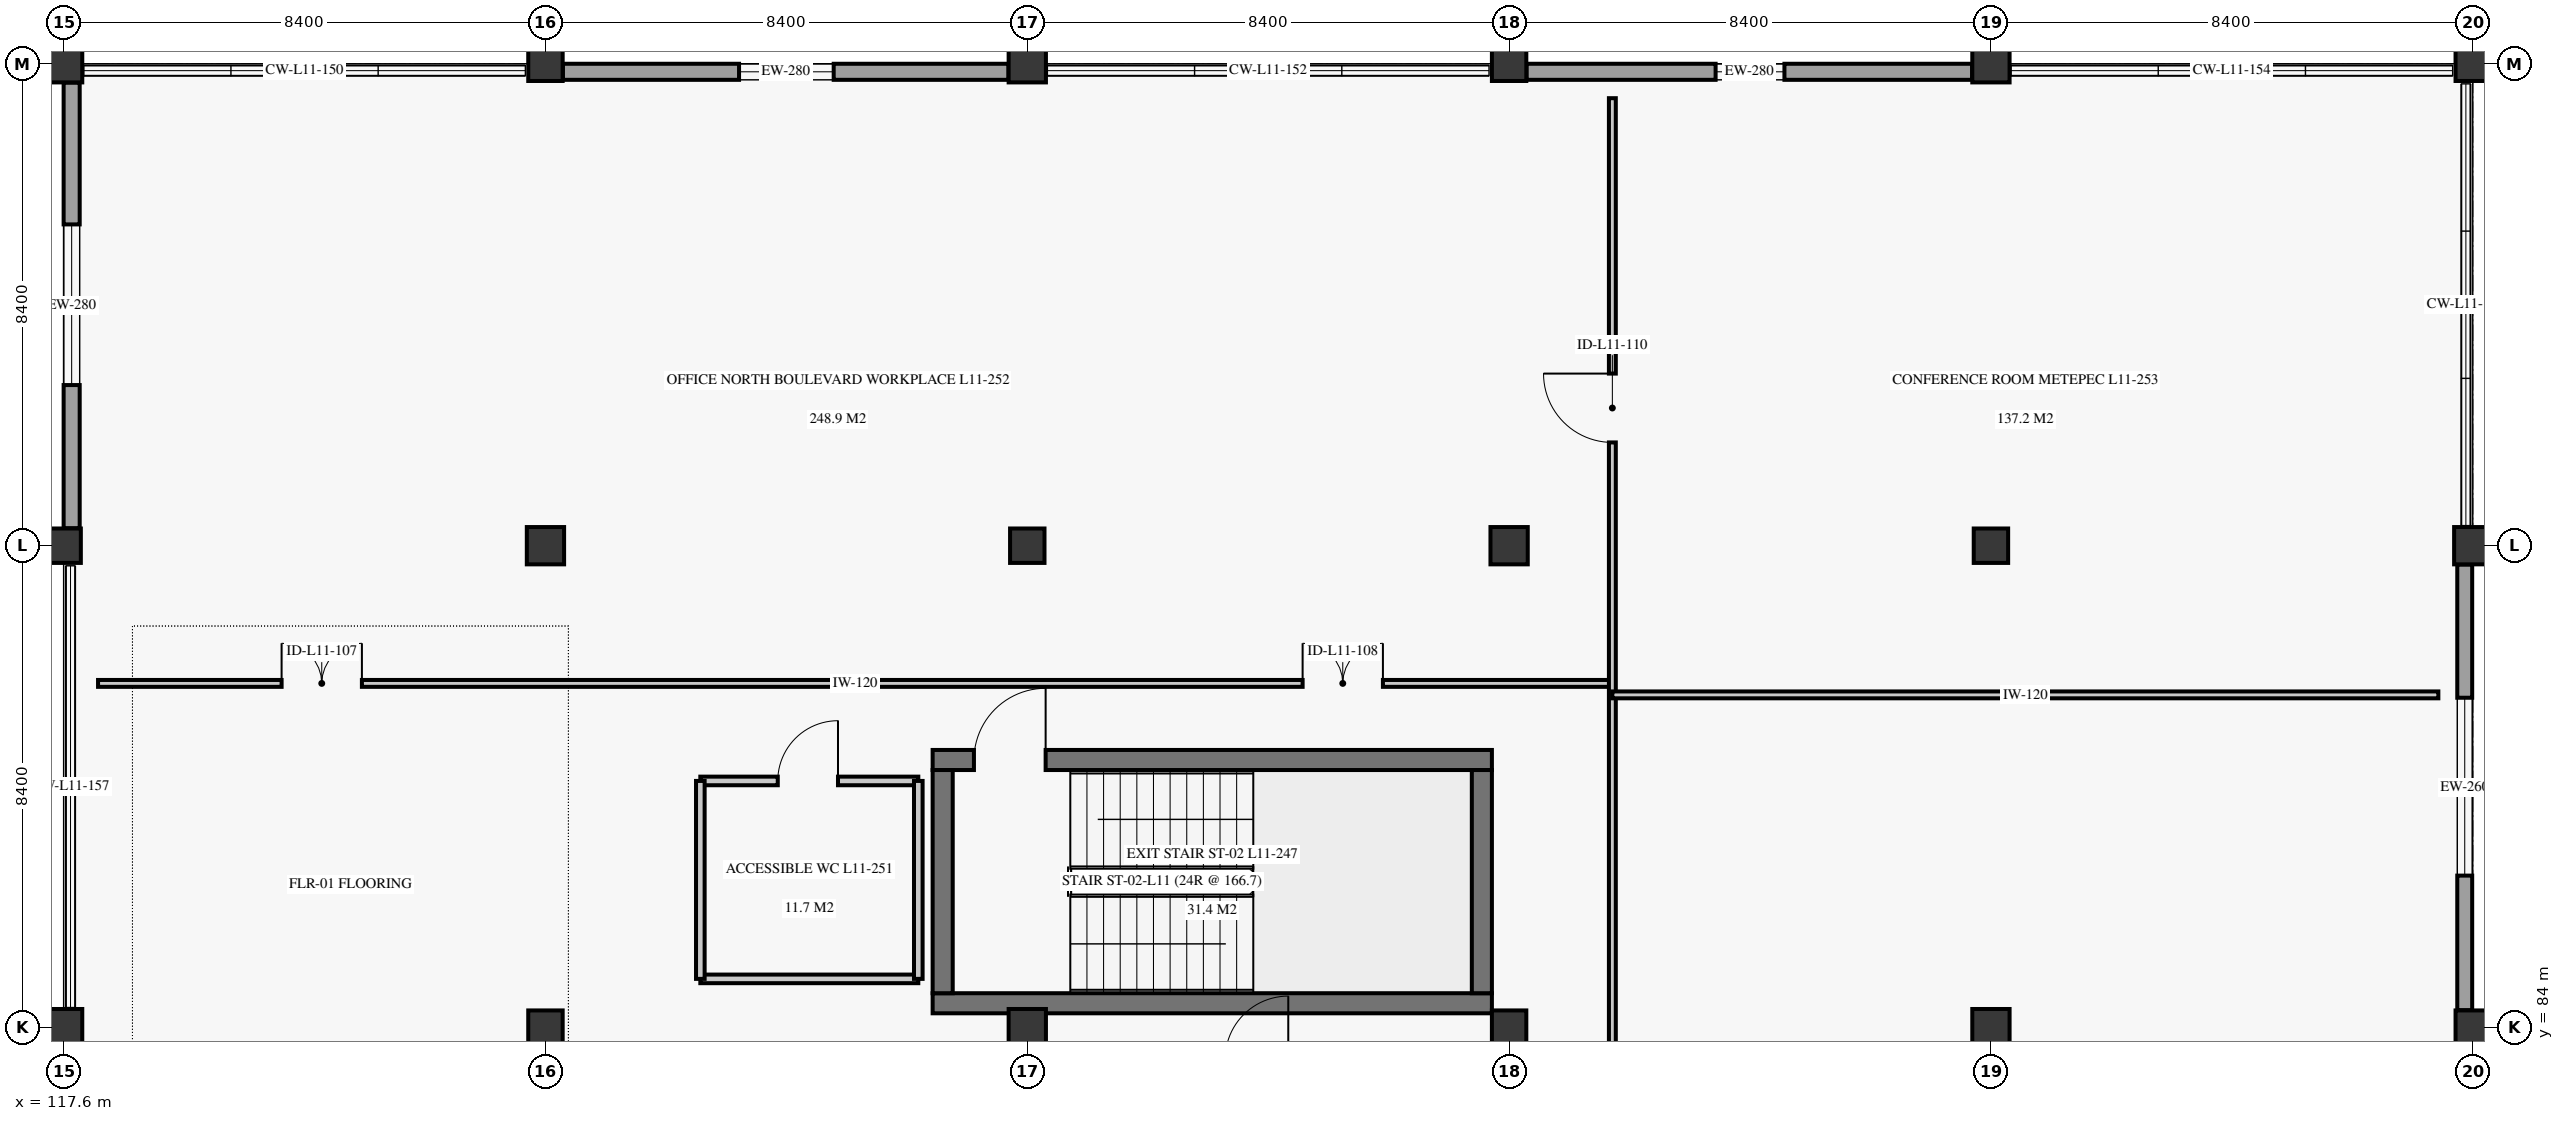
"""IFC4 building model, lengths in metres.
Left out: names, types, materials, properties, quantities, classifications, styles, units other than length and angle.
Written with IfcOpenShell. Run it as: python <this file> out.ifc"""

import sys

from ifc_helpers import new_model, si_unit, direction, frame, frame_2d, origin, origin_2d, place, context, subcontext, project, spatial, rectangle, extrude, element, fill, save


model = new_model("IFC4")
c1 = context("Model", 3, precision=1e-05, world=origin(), true_north=direction((0.0, 1.0)))
c2 = subcontext(c1, "Body", "Model", "MODEL_VIEW")
j1 = project(units=[si_unit("LENGTHUNIT", "METRE"), si_unit("PLANEANGLEUNIT", "RADIAN")], contexts=[c1])
p1 = place(None, origin())
s1 = spatial("IfcSite", under=j1, at=p1, CompositionType="ELEMENT")
p2 = place(p1, origin())
s2 = spatial("IfcBuilding", under=s1, at=p2, CompositionType="ELEMENT")
p3 = place(p2, frame((0.0, 0.0, 46.7)))
s3 = spatial("IfcBuildingStorey", under=s2, at=p3, CompositionType="ELEMENT", Elevation=46.7)
p4 = place(p3, frame((117.6, 84.0, 0.0), z_axis=(0.0, 0.0, 1.0), x_axis=(1.0, 0.0, 0.0)))
e1 = element("IfcColumn", 1, at=p4, inside=s3, PredefinedType="COLUMN", context=c2, shape_type="SweptSolid", body=[
    extrude(rectangle(XDim=0.65, YDim=0.65, at=origin_2d()), origin(), (0.0, 0.0, 1.0), 3.72),
])
p5 = place(p3, frame((117.6, 92.4, 0.0), z_axis=(0.0, 0.0, 1.0), x_axis=(1.0, 0.0, 0.0)))
e2 = element("IfcColumn", 2, at=p5, inside=s3, PredefinedType="COLUMN", context=c2, shape_type="SweptSolid", body=[
    extrude(rectangle(XDim=0.6, YDim=0.6, at=origin_2d()), origin(), (0.0, 0.0, 1.0), 3.72),
])
p6 = place(p3, frame((117.6, 100.8, 0.0), z_axis=(0.0, 0.0, 1.0), x_axis=(1.0, 0.0, 0.0)))
e3 = element("IfcColumn", 3, at=p6, inside=s3, PredefinedType="COLUMN", context=c2, shape_type="SweptSolid", body=[
    extrude(rectangle(XDim=0.65, YDim=0.65, at=origin_2d()), origin(), (0.0, 0.0, 1.0), 3.72),
])
p7 = place(p3, frame((126.0, 84.0, 0.0), z_axis=(0.0, 0.0, 1.0), x_axis=(1.0, 0.0, 0.0)))
e4 = element("IfcColumn", 4, at=p7, inside=s3, PredefinedType="COLUMN", context=c2, shape_type="SweptSolid", body=[
    extrude(rectangle(XDim=0.6, YDim=0.6, at=origin_2d()), origin(), (0.0, 0.0, 1.0), 3.72),
])
p8 = place(p3, frame((126.0, 92.4, 0.0), z_axis=(0.0, 0.0, 1.0), x_axis=(1.0, 0.0, 0.0)))
e5 = element("IfcColumn", 5, at=p8, inside=s3, PredefinedType="COLUMN", context=c2, shape_type="SweptSolid", body=[
    extrude(rectangle(XDim=0.65, YDim=0.65, at=origin_2d()), origin(), (0.0, 0.0, 1.0), 3.72),
])
p9 = place(p3, frame((126.0, 100.8, 0.0), z_axis=(0.0, 0.0, 1.0), x_axis=(1.0, 0.0, 0.0)))
e6 = element("IfcColumn", 6, at=p9, inside=s3, PredefinedType="COLUMN", context=c2, shape_type="SweptSolid", body=[
    extrude(rectangle(XDim=0.6, YDim=0.6, at=origin_2d()), origin(), (0.0, 0.0, 1.0), 3.72),
])
p10 = place(p3, frame((134.4, 84.0, 0.0), z_axis=(0.0, 0.0, 1.0), x_axis=(1.0, 0.0, 0.0)))
e7 = element("IfcColumn", 7, at=p10, inside=s3, PredefinedType="COLUMN", context=c2, shape_type="SweptSolid", body=[
    extrude(rectangle(XDim=0.65, YDim=0.65, at=origin_2d()), origin(), (0.0, 0.0, 1.0), 3.72),
])
p11 = place(p3, frame((134.4, 92.4, 0.0), z_axis=(0.0, 0.0, 1.0), x_axis=(1.0, 0.0, 0.0)))
e8 = element("IfcColumn", 8, at=p11, inside=s3, PredefinedType="COLUMN", context=c2, shape_type="SweptSolid", body=[
    extrude(rectangle(XDim=0.6, YDim=0.6, at=origin_2d()), origin(), (0.0, 0.0, 1.0), 3.72),
])
p12 = place(p3, frame((134.4, 100.8, 0.0), z_axis=(0.0, 0.0, 1.0), x_axis=(1.0, 0.0, 0.0)))
e9 = element("IfcColumn", 9, at=p12, inside=s3, PredefinedType="COLUMN", context=c2, shape_type="SweptSolid", body=[
    extrude(rectangle(XDim=0.65, YDim=0.65, at=origin_2d()), origin(), (0.0, 0.0, 1.0), 3.72),
])
p13 = place(p3, frame((142.8, 84.0, 0.0), z_axis=(0.0, 0.0, 1.0), x_axis=(1.0, 0.0, 0.0)))
e10 = element("IfcColumn", 10, at=p13, inside=s3, PredefinedType="COLUMN", context=c2, shape_type="SweptSolid", body=[
    extrude(rectangle(XDim=0.6, YDim=0.6, at=origin_2d()), origin(), (0.0, 0.0, 1.0), 3.72),
])
p14 = place(p3, frame((142.8, 92.4, 0.0), z_axis=(0.0, 0.0, 1.0), x_axis=(1.0, 0.0, 0.0)))
e11 = element("IfcColumn", 11, at=p14, inside=s3, PredefinedType="COLUMN", context=c2, shape_type="SweptSolid", body=[
    extrude(rectangle(XDim=0.65, YDim=0.65, at=origin_2d()), origin(), (0.0, 0.0, 1.0), 3.72),
])
p15 = place(p3, frame((142.8, 100.8, 0.0), z_axis=(0.0, 0.0, 1.0), x_axis=(1.0, 0.0, 0.0)))
e12 = element("IfcColumn", 12, at=p15, inside=s3, PredefinedType="COLUMN", context=c2, shape_type="SweptSolid", body=[
    extrude(rectangle(XDim=0.6, YDim=0.6, at=origin_2d()), origin(), (0.0, 0.0, 1.0), 3.72),
])
p16 = place(p3, frame((151.2, 84.0, 0.0), z_axis=(0.0, 0.0, 1.0), x_axis=(1.0, 0.0, 0.0)))
e13 = element("IfcColumn", 13, at=p16, inside=s3, PredefinedType="COLUMN", context=c2, shape_type="SweptSolid", body=[
    extrude(rectangle(XDim=0.65, YDim=0.65, at=origin_2d()), origin(), (0.0, 0.0, 1.0), 3.72),
])
p17 = place(p3, frame((151.2, 92.4, 0.0), z_axis=(0.0, 0.0, 1.0), x_axis=(1.0, 0.0, 0.0)))
e14 = element("IfcColumn", 14, at=p17, inside=s3, PredefinedType="COLUMN", context=c2, shape_type="SweptSolid", body=[
    extrude(rectangle(XDim=0.6, YDim=0.6, at=origin_2d()), origin(), (0.0, 0.0, 1.0), 3.72),
])
p18 = place(p3, frame((151.2, 100.8, 0.0), z_axis=(0.0, 0.0, 1.0), x_axis=(1.0, 0.0, 0.0)))
e15 = element("IfcColumn", 15, at=p18, inside=s3, PredefinedType="COLUMN", context=c2, shape_type="SweptSolid", body=[
    extrude(rectangle(XDim=0.65, YDim=0.65, at=origin_2d()), origin(), (0.0, 0.0, 1.0), 3.72),
])
p19 = place(p3, frame((159.6, 84.0, 0.0), z_axis=(0.0, 0.0, 1.0), x_axis=(1.0, 0.0, 0.0)))
e16 = element("IfcColumn", 16, at=p19, inside=s3, PredefinedType="COLUMN", context=c2, shape_type="SweptSolid", body=[
    extrude(rectangle(XDim=0.6, YDim=0.6, at=origin_2d()), origin(), (0.0, 0.0, 1.0), 3.72),
])
p20 = place(p3, frame((159.6, 92.4, 0.0), z_axis=(0.0, 0.0, 1.0), x_axis=(1.0, 0.0, 0.0)))
e17 = element("IfcColumn", 17, at=p20, inside=s3, PredefinedType="COLUMN", context=c2, shape_type="SweptSolid", body=[
    extrude(rectangle(XDim=0.65, YDim=0.65, at=origin_2d()), origin(), (0.0, 0.0, 1.0), 3.72),
])
p21 = place(p3, frame((159.6, 100.8, 0.0), z_axis=(0.0, 0.0, 1.0), x_axis=(1.0, 0.0, 0.0)))
e18 = element("IfcColumn", 18, at=p21, inside=s3, PredefinedType="COLUMN", context=c2, shape_type="SweptSolid", body=[
    extrude(rectangle(XDim=0.6, YDim=0.6, at=origin_2d()), origin(), (0.0, 0.0, 1.0), 3.72),
])
p22 = place(p3, frame((126.304, 100.66, 0.0), z_axis=(0.0, 0.0, 1.0), x_axis=(1.0, 0.0, 0.0)))
e19 = element("IfcWall", 19, at=p22, inside=s3, PredefinedType="SOLIDWALL", context=c2, shape_type="SweptSolid", body=[
    extrude(rectangle(XDim=7.768, YDim=0.28, at=frame_2d((3.884, 0.0))), origin(), (0.0, 0.0, 1.0), 3.04),
])
p23 = place(p22, frame((3.071, 0.0, 0.85)))
e20 = element("IfcOpeningElement", 20, at=p23, cuts=e19, PredefinedType="OPENING", context=c2, shape_type="SweptSolid", body=[
    extrude(rectangle(XDim=1.65, YDim=1.75, at=frame_2d((0.825, 0.875))), frame((0.0, 0.15, 0.0), z_axis=(0.0, -1.0, 0.0), x_axis=(1.0, 0.0, 0.0)), (0.0, 0.0, 1.0), 0.3),
])
p24 = place(p3, frame((143.104, 100.66, 0.0), z_axis=(0.0, 0.0, 1.0), x_axis=(1.0, 0.0, 0.0)))
e21 = element("IfcWall", 21, at=p24, inside=s3, PredefinedType="SOLIDWALL", context=c2, shape_type="SweptSolid", body=[
    extrude(rectangle(XDim=7.768, YDim=0.28, at=frame_2d((3.884, 0.0))), origin(), (0.0, 0.0, 1.0), 3.04),
])
p25 = place(p24, frame((3.296, 0.0, 0.85)))
e22 = element("IfcOpeningElement", 22, at=p25, cuts=e21, PredefinedType="OPENING", context=c2, shape_type="SweptSolid", body=[
    extrude(rectangle(XDim=1.2, YDim=1.6, at=frame_2d((0.6, 0.8))), frame((0.0, 0.15, 0.0), z_axis=(0.0, -1.0, 0.0), x_axis=(1.0, 0.0, 0.0)), (0.0, 0.0, 1.0), 0.3),
])
p26 = place(p3, frame((159.46, 84.304, 0.0), z_axis=(0.0, 0.0, 1.0), x_axis=(0.0, 1.0, 0.0)))
e23 = element("IfcWall", 23, at=p26, inside=s3, PredefinedType="SOLIDWALL", context=c2, shape_type="SweptSolid", body=[
    extrude(rectangle(XDim=7.768, YDim=0.26, at=frame_2d((3.884, 0.0))), origin(), (0.0, 0.0, 1.0), 3.04),
])
p27 = place(p26, frame((2.346, 0.0, 0.85)))
e24 = element("IfcOpeningElement", 24, at=p27, cuts=e23, PredefinedType="OPENING", context=c2, shape_type="SweptSolid", body=[
    extrude(rectangle(XDim=3.1, YDim=1.85, at=frame_2d((1.55, 0.925))), frame((0.0, 0.14, 0.0), z_axis=(0.0, -1.0, 0.0), x_axis=(1.0, 0.0, 0.0)), (0.0, 0.0, 1.0), 0.28),
])
p28 = place(p3, frame((117.74, 92.704, 0.0), z_axis=(0.0, 0.0, 1.0), x_axis=(0.0, 1.0, 0.0)))
e25 = element("IfcWall", 25, at=p28, inside=s3, PredefinedType="SOLIDWALL", context=c2, shape_type="SweptSolid", body=[
    extrude(rectangle(XDim=7.768, YDim=0.28, at=frame_2d((3.884, 0.0))), origin(), (0.0, 0.0, 1.0), 3.04),
])
p29 = place(p28, frame((2.496, 0.0, 0.85)))
e26 = element("IfcOpeningElement", 26, at=p29, cuts=e25, PredefinedType="OPENING", context=c2, shape_type="SweptSolid", body=[
    extrude(rectangle(XDim=2.8, YDim=1.85, at=frame_2d((1.4, 0.925))), frame((0.0, 0.15, 0.0), z_axis=(0.0, -1.0, 0.0), x_axis=(1.0, 0.0, 0.0)), (0.0, 0.0, 1.0), 0.3),
])
p30 = place(p3, frame((132.75, 84.425, 0.0), z_axis=(0.0, 0.0, 1.0), x_axis=(1.0, 0.0, 0.0)))
e27 = element("IfcWall", 27, at=p30, inside=s3, PredefinedType="SHEAR", context=c2, shape_type="SweptSolid", body=[
    extrude(rectangle(XDim=9.75, YDim=0.35, at=frame_2d((4.875, 0.0))), origin(), (0.0, 0.0, 1.0), 3.72),
])
p31 = place(p3, frame((132.75, 88.665, 0.0), z_axis=(0.0, 0.0, 1.0), x_axis=(1.0, 0.0, 0.0)))
e28 = element("IfcWall", 28, at=p31, inside=s3, PredefinedType="SHEAR", context=c2, shape_type="SweptSolid", body=[
    extrude(rectangle(XDim=9.75, YDim=0.35, at=frame_2d((4.875, 0.0))), origin(), (0.0, 0.0, 1.0), 3.72),
])
p32 = place(p31, frame((0.72, 0.0, 0.0)))
e29 = element("IfcOpeningElement", 29, at=p32, cuts=e28, PredefinedType="OPENING", context=c2, shape_type="SweptSolid", body=[
    extrude(rectangle(XDim=1.25, YDim=2.2, at=frame_2d((0.625, 1.1))), frame((0.0, 0.185, 0.0), z_axis=(0.0, -1.0, 0.0), x_axis=(1.0, 0.0, 0.0)), (0.0, 0.0, 1.0), 0.37),
])
for number, where, z_axis, x_axis in (
    (30, (132.925, 84.6, 0.0), (0.0, 0.0, 1.0), (0.0, 1.0, 0.0)),
    (31, (142.325, 84.6, 0.0), (0.0, 0.0, 1.0), (0.0, 1.0, 0.0)),
):
    element("IfcWall", number, at=place(p3, frame(where, z_axis=z_axis, x_axis=x_axis)), inside=s3, PredefinedType="SHEAR", context=c2, shape_type="SweptSolid", body=[
        extrude(rectangle(XDim=3.89, YDim=0.35, at=frame_2d((1.945, 0.0))), origin(), (0.0, 0.0, 1.0), 3.72),
    ])
p33 = place(p3, frame((128.7, 88.3, 0.0), z_axis=(0.0, 0.0, 1.0), x_axis=(1.0, 0.0, 0.0)))
e32 = element("IfcWall", 32, at=p33, inside=s3, PredefinedType="PARTITIONING", context=c2, shape_type="SweptSolid", body=[
    extrude(rectangle(XDim=3.8, YDim=0.15, at=frame_2d((1.9, 0.0))), origin(), (0.0, 0.0, 1.0), 3.34),
])
p34 = place(p33, frame((1.35, 0.0, 0.0)))
e33 = element("IfcOpeningElement", 33, at=p34, cuts=e32, PredefinedType="OPENING", context=c2, shape_type="SweptSolid", body=[
    extrude(rectangle(XDim=1.05, YDim=2.15, at=frame_2d((0.525, 1.075))), frame((0.0, 0.085, 0.0), z_axis=(0.0, -1.0, 0.0), x_axis=(1.0, 0.0, 0.0)), (0.0, 0.0, 1.0), 0.17),
])
p35 = place(p3, frame((128.7, 84.85, 0.0), z_axis=(0.0, 0.0, 1.0), x_axis=(1.0, 0.0, 0.0)))
e34 = element("IfcWall", 34, at=p35, inside=s3, PredefinedType="PARTITIONING", context=c2, shape_type="SweptSolid", body=[
    extrude(rectangle(XDim=3.8, YDim=0.15, at=frame_2d((1.9, 0.0))), origin(), (0.0, 0.0, 1.0), 3.34),
])
for number, where, z_axis, x_axis in (
    (35, (128.7, 84.85, 0.0), (0.0, 0.0, 1.0), (0.0, 1.0, 0.0)),
    (36, (132.5, 84.85, 0.0), (0.0, 0.0, 1.0), (0.0, 1.0, 0.0)),
):
    element("IfcWall", number, at=place(p3, frame(where, z_axis=z_axis, x_axis=x_axis)), inside=s3, PredefinedType="PARTITIONING", context=c2, shape_type="SweptSolid", body=[
        extrude(rectangle(XDim=3.45, YDim=0.15, at=frame_2d((1.725, 0.0))), origin(), (0.0, 0.0, 1.0), 3.34),
    ])
p36 = place(p3, frame((118.2, 90.0, 0.0), z_axis=(0.0, 0.0, 1.0), x_axis=(1.0, 0.0, 0.0)))
e37 = element("IfcWall", 37, at=p36, inside=s3, PredefinedType="PARTITIONING", context=c2, shape_type="SweptSolid", body=[
    extrude(rectangle(XDim=26.4, YDim=0.12, at=frame_2d((13.2, 0.0))), origin(), (0.0, 0.0, 1.0), 3.34),
])
p37 = place(p36, frame((3.2, 0.0, 0.0)))
e38 = element("IfcOpeningElement", 38, at=p37, cuts=e37, PredefinedType="OPENING", context=c2, shape_type="SweptSolid", body=[
    extrude(rectangle(XDim=1.4, YDim=2.35, at=frame_2d((0.7, 1.175))), frame((0.0, 0.07, 0.0), z_axis=(0.0, -1.0, 0.0), x_axis=(1.0, 0.0, 0.0)), (0.0, 0.0, 1.0), 0.14),
])
p38 = place(p36, frame((21.0, 0.0, 0.0)))
e39 = element("IfcOpeningElement", 39, at=p38, cuts=e37, PredefinedType="OPENING", context=c2, shape_type="SweptSolid", body=[
    extrude(rectangle(XDim=1.4, YDim=2.35, at=frame_2d((0.7, 1.175))), frame((0.0, 0.07, 0.0), z_axis=(0.0, -1.0, 0.0), x_axis=(1.0, 0.0, 0.0)), (0.0, 0.0, 1.0), 0.14),
])
p39 = place(p3, frame((144.6, 67.8, 0.0), z_axis=(0.0, 0.0, 1.0), x_axis=(0.0, 1.0, 0.0)))
e40 = element("IfcWall", 40, at=p39, inside=s3, PredefinedType="PARTITIONING", context=c2, shape_type="SweptSolid", body=[
    extrude(rectangle(XDim=32.4, YDim=0.12, at=frame_2d((16.2, 0.0))), origin(), (0.0, 0.0, 1.0), 3.34),
])
p40 = place(p39, frame((4.2, 0.0, 0.0)))
e41 = element("IfcOpeningElement", 41, at=p40, cuts=e40, PredefinedType="OPENING", context=c2, shape_type="SweptSolid", body=[
    extrude(rectangle(XDim=1.1, YDim=2.15, at=frame_2d((0.55, 1.075))), frame((0.0, 0.07, 0.0), z_axis=(0.0, -1.0, 0.0), x_axis=(1.0, 0.0, 0.0)), (0.0, 0.0, 1.0), 0.14),
])
p41 = place(p39, frame((26.4, 0.0, 0.0)))
e42 = element("IfcOpeningElement", 42, at=p41, cuts=e40, PredefinedType="OPENING", context=c2, shape_type="SweptSolid", body=[
    extrude(rectangle(XDim=1.2, YDim=2.3, at=frame_2d((0.6, 1.15))), frame((0.0, 0.07, 0.0), z_axis=(0.0, -1.0, 0.0), x_axis=(1.0, 0.0, 0.0)), (0.0, 0.0, 1.0), 0.14),
])
p42 = place(p3, frame((144.6, 89.8, 0.0), z_axis=(0.0, 0.0, 1.0), x_axis=(1.0, 0.0, 0.0)))
e43 = element("IfcWall", 43, at=p42, inside=s3, PredefinedType="PARTITIONING", context=c2, shape_type="SweptSolid", body=[
    extrude(rectangle(XDim=14.4, YDim=0.12, at=frame_2d((7.2, 0.0))), origin(), (0.0, 0.0, 1.0), 3.34),
])
p43 = place(p23, origin())
e44 = element("IfcWindow", 44, at=p43, inside=s3, PartitioningType="SINGLE_PANEL", PredefinedType="WINDOW", context=c2, shape_type="SweptSolid", body=[
    extrude(rectangle(XDim=1.65, YDim=1.75, at=frame_2d((0.825, 0.875))), frame((0.0, 0.03, 0.0), z_axis=(0.0, -1.0, 0.0), x_axis=(1.0, 0.0, 0.0)), (0.0, 0.0, 1.0), 0.06),
])
fill(e20, e44)
p44 = place(p25, origin())
e45 = element("IfcWindow", 45, at=p44, inside=s3, PartitioningType="SINGLE_PANEL", PredefinedType="WINDOW", context=c2, shape_type="SweptSolid", body=[
    extrude(rectangle(XDim=1.2, YDim=1.6, at=frame_2d((0.6, 0.8))), frame((0.0, 0.03, 0.0), z_axis=(0.0, -1.0, 0.0), x_axis=(1.0, 0.0, 0.0)), (0.0, 0.0, 1.0), 0.06),
])
fill(e22, e45)
p45 = place(p27, origin())
e46 = element("IfcWindow", 46, at=p45, inside=s3, PartitioningType="SINGLE_PANEL", PredefinedType="WINDOW", context=c2, shape_type="SweptSolid", body=[
    extrude(rectangle(XDim=3.1, YDim=1.85, at=frame_2d((1.55, 0.925))), frame((0.0, 0.03, 0.0), z_axis=(0.0, -1.0, 0.0), x_axis=(1.0, 0.0, 0.0)), (0.0, 0.0, 1.0), 0.06),
])
fill(e24, e46)
p46 = place(p29, origin())
e47 = element("IfcWindow", 47, at=p46, inside=s3, PartitioningType="SINGLE_PANEL", PredefinedType="WINDOW", context=c2, shape_type="SweptSolid", body=[
    extrude(rectangle(XDim=2.8, YDim=1.85, at=frame_2d((1.4, 0.925))), frame((0.0, 0.03, 0.0), z_axis=(0.0, -1.0, 0.0), x_axis=(1.0, 0.0, 0.0)), (0.0, 0.0, 1.0), 0.06),
])
fill(e26, e47)
p47 = place(p32, origin())
e48 = element("IfcDoor", 48, at=p47, inside=s3, OperationType="SINGLE_SWING_RIGHT", PredefinedType="DOOR", context=c2, shape_type="SweptSolid", body=[
    extrude(rectangle(XDim=1.25, YDim=2.2, at=frame_2d((0.625, 1.1))), frame((0.0, 0.025, 0.0), z_axis=(0.0, -1.0, 0.0), x_axis=(1.0, 0.0, 0.0)), (0.0, 0.0, 1.0), 0.05),
])
fill(e29, e48)
p48 = place(p34, origin())
e49 = element("IfcDoor", 49, at=p48, inside=s3, OperationType="SINGLE_SWING_RIGHT", PredefinedType="DOOR", context=c2, shape_type="SweptSolid", body=[
    extrude(rectangle(XDim=1.05, YDim=2.15, at=frame_2d((0.525, 1.075))), frame((0.0, 0.025, 0.0), z_axis=(0.0, -1.0, 0.0), x_axis=(1.0, 0.0, 0.0)), (0.0, 0.0, 1.0), 0.05),
])
fill(e33, e49)
p49 = place(p37, origin())
e50 = element("IfcDoor", 50, at=p49, inside=s3, OperationType="DOUBLE_DOOR_SINGLE_SWING", PredefinedType="DOOR", context=c2, shape_type="SweptSolid", body=[
    extrude(rectangle(XDim=1.4, YDim=2.35, at=frame_2d((0.7, 1.175))), frame((0.0, 0.025, 0.0), z_axis=(0.0, -1.0, 0.0), x_axis=(1.0, 0.0, 0.0)), (0.0, 0.0, 1.0), 0.05),
])
fill(e38, e50)
p50 = place(p38, origin())
e51 = element("IfcDoor", 51, at=p50, inside=s3, OperationType="DOUBLE_DOOR_SINGLE_SWING", PredefinedType="DOOR", context=c2, shape_type="SweptSolid", body=[
    extrude(rectangle(XDim=1.4, YDim=2.35, at=frame_2d((0.7, 1.175))), frame((0.0, 0.025, 0.0), z_axis=(0.0, -1.0, 0.0), x_axis=(1.0, 0.0, 0.0)), (0.0, 0.0, 1.0), 0.05),
])
fill(e39, e51)
p51 = place(p41, origin())
e52 = element("IfcDoor", 52, at=p51, inside=s3, OperationType="SINGLE_SWING_RIGHT", PredefinedType="DOOR", context=c2, shape_type="SweptSolid", body=[
    extrude(rectangle(XDim=1.2, YDim=2.3, at=frame_2d((0.6, 1.15))), frame((0.0, 0.025, 0.0), z_axis=(0.0, -1.0, 0.0), x_axis=(1.0, 0.0, 0.0)), (0.0, 0.0, 1.0), 0.05),
])
fill(e42, e52)
save(model, sys.argv[1])
